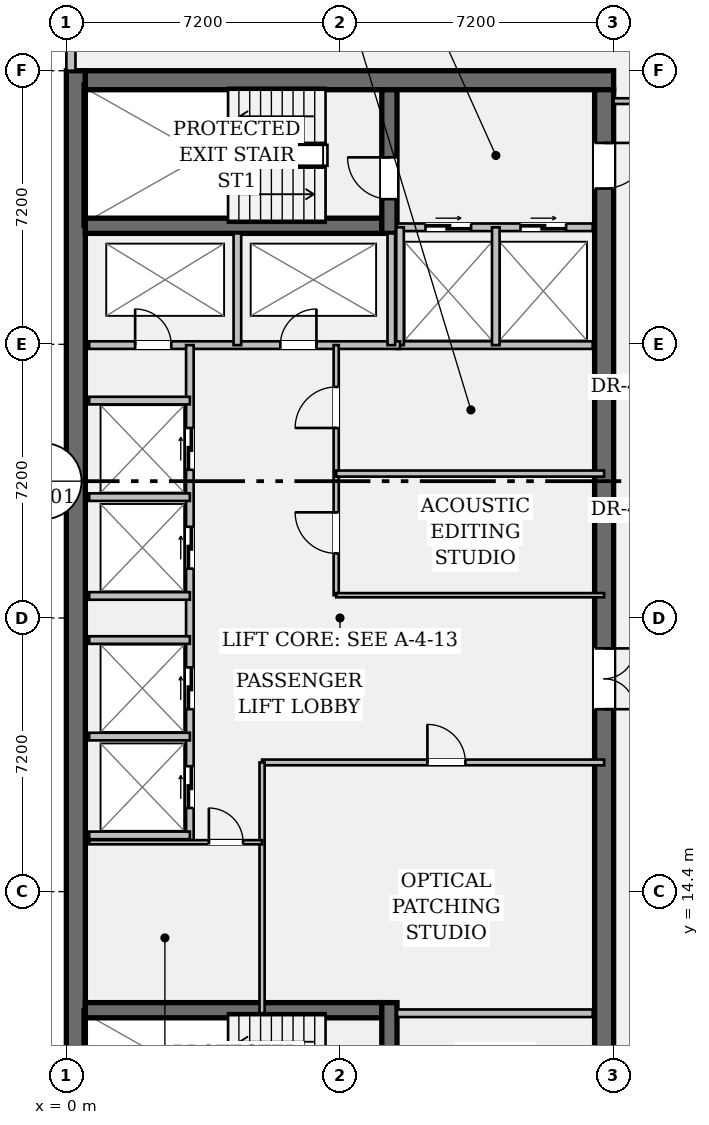
"""IFC4 building model, lengths in metres.
Left out: names, types, materials, properties, quantities, classifications, styles, units other than length and angle.
Written with IfcOpenShell. Run it as: python <this file> out.ifc"""

import sys

from ifc_helpers import new_model, si_unit, direction, frame, frame_2d, origin, place, context, subcontext, project, spatial, rectangle, extrude, element, fill, save


model = new_model("IFC4")
c1 = context("Model", 3, precision=1e-05, world=origin(), true_north=direction((0.0, 1.0)))
c2 = subcontext(c1, "Body", "Model", "MODEL_VIEW")
j1 = project(units=[si_unit("LENGTHUNIT", "METRE"), si_unit("PLANEANGLEUNIT", "RADIAN")], contexts=[c1])
p1 = place(None, origin())
s1 = spatial("IfcSite", under=j1, at=p1, CompositionType="ELEMENT")
p2 = place(p1, origin())
s2 = spatial("IfcBuilding", under=s1, at=p2, CompositionType="ELEMENT")
p3 = place(p2, frame((0.0, 0.0, 279.65)))
s3 = spatial("IfcBuildingStorey", under=s2, at=p3, CompositionType="ELEMENT", Elevation=279.65)
p4 = place(p3, frame((0.25, 7.2, 0.0), z_axis=(0.0, 0.0, 1.0), x_axis=(0.0, 1.0, 0.0)))
e1 = element("IfcWall", 1, at=p4, inside=s3, PredefinedType="SHEAR", context=c2, shape_type="SweptSolid", body=[
    extrude(rectangle(XDim=28.8, YDim=0.5, at=frame_2d((14.4, 0.0))), origin(), (0.0, 0.0, 1.0), 3.24),
])
p5 = place(p3, frame((0.5, 35.75, 0.0), z_axis=(0.0, 0.0, 1.0), x_axis=(1.0, 0.0, 0.0)))
e2 = element("IfcWall", 2, at=p5, inside=s3, PredefinedType="SHEAR", context=c2, shape_type="SweptSolid", body=[
    extrude(rectangle(XDim=13.9, YDim=0.5, at=frame_2d((6.95, 0.0))), origin(), (0.0, 0.0, 1.0), 3.24),
])
p6 = place(p3, frame((14.15, 35.5, 0.0), z_axis=(0.0, 0.0, 1.0), x_axis=(0.0, -1.0, 0.0)))
e3 = element("IfcWall", 3, at=p6, inside=s3, PredefinedType="SHEAR", context=c2, shape_type="SweptSolid", body=[
    extrude(rectangle(XDim=27.8, YDim=0.5, at=frame_2d((13.9, 0.0))), origin(), (0.0, 0.0, 1.0), 3.24),
])
p7 = place(p6, frame((1.4, 0.0, 0.0)))
e4 = element("IfcOpeningElement", 4, at=p7, cuts=e3, PredefinedType="OPENING", context=c2, shape_type="SweptSolid", body=[
    extrude(rectangle(XDim=1.2, YDim=2.15, at=frame_2d((0.6, 1.075))), frame((0.0, 0.262, 0.0), z_axis=(0.0, -1.0, 0.0), x_axis=(1.0, 0.0, 0.0)), (0.0, 0.0, 1.0), 0.524),
])
p8 = place(p6, frame((25.35, 0.0, 0.0)))
e5 = element("IfcOpeningElement", 5, at=p8, cuts=e3, PredefinedType="OPENING", context=c2, shape_type="SweptSolid", body=[
    extrude(rectangle(XDim=1.2, YDim=2.15, at=frame_2d((0.6, 1.075))), frame((0.0, 0.262, 0.0), z_axis=(0.0, -1.0, 0.0), x_axis=(1.0, 0.0, 0.0)), (0.0, 0.0, 1.0), 0.524),
])
p9 = place(p6, frame((14.7, 0.0, 0.0)))
e6 = element("IfcOpeningElement", 6, at=p9, cuts=e3, PredefinedType="OPENING", context=c2, shape_type="SweptSolid", body=[
    extrude(rectangle(XDim=1.6, YDim=2.2, at=frame_2d((0.8, 1.1))), frame((0.0, 0.262, 0.0), z_axis=(0.0, -1.0, 0.0), x_axis=(1.0, 0.0, 0.0)), (0.0, 0.0, 1.0), 0.524),
])
for number, where, z_axis, x_axis in (
    (7, (0.5, 31.92, 0.0), (0.0, 0.0, 1.0), (1.0, 0.0, 0.0)),
    (8, (0.5, 11.28, 0.0), (0.0, 0.0, 1.0), (1.0, 0.0, 0.0)),
):
    element("IfcWall", number, at=place(p3, frame(where, z_axis=z_axis, x_axis=x_axis)), inside=s3, PredefinedType="SHEAR", context=c2, shape_type="SweptSolid", body=[
        extrude(rectangle(XDim=7.8, YDim=0.4, at=frame_2d((3.9, 0.0))), origin(), (0.0, 0.0, 1.0), 3.24),
    ])
p10 = place(p3, frame((8.5, 31.72, 0.0), z_axis=(0.0, 0.0, 1.0), x_axis=(0.0, 1.0, 0.0)))
e9 = element("IfcWall", 9, at=p10, inside=s3, PredefinedType="SHEAR", context=c2, shape_type="SweptSolid", body=[
    extrude(rectangle(XDim=3.78, YDim=0.4, at=frame_2d((1.89, 0.0))), origin(), (0.0, 0.0, 1.0), 3.24),
])
p11 = place(p10, frame((0.9, 0.0, 0.0)))
e10 = element("IfcOpeningElement", 10, at=p11, cuts=e9, PredefinedType="OPENING", context=c2, shape_type="SweptSolid", body=[
    extrude(rectangle(XDim=1.1, YDim=2.15, at=frame_2d((0.55, 1.075))), frame((0.0, 0.212, 0.0), z_axis=(0.0, -1.0, 0.0), x_axis=(1.0, 0.0, 0.0)), (0.0, 0.0, 1.0), 0.424),
])
p12 = place(p3, frame((8.5, 7.7, 0.0), z_axis=(0.0, 0.0, 1.0), x_axis=(0.0, 1.0, 0.0)))
e11 = element("IfcWall", 11, at=p12, inside=s3, PredefinedType="SHEAR", context=c2, shape_type="SweptSolid", body=[
    extrude(rectangle(XDim=3.78, YDim=0.4, at=frame_2d((1.89, 0.0))), origin(), (0.0, 0.0, 1.0), 3.24),
])
p13 = place(p12, frame((0.85, 0.0, 0.0)))
e12 = element("IfcOpeningElement", 12, at=p13, cuts=e11, PredefinedType="OPENING", context=c2, shape_type="SweptSolid", body=[
    extrude(rectangle(XDim=1.1, YDim=2.15, at=frame_2d((0.55, 1.075))), frame((0.0, 0.212, 0.0), z_axis=(0.0, -1.0, 0.0), x_axis=(1.0, 0.0, 0.0)), (0.0, 0.0, 1.0), 0.424),
])
p14 = place(p3, frame((0.12, 36.0, 0.0), z_axis=(0.0, 0.0, 1.0), x_axis=(0.0, 1.0, 0.0)))
e13 = element("IfcWall", 13, at=p14, inside=s3, PredefinedType="STANDARD", context=c2, shape_type="SweptSolid", body=[
    extrude(rectangle(XDim=1.21, YDim=0.24, at=frame_2d((0.605, 0.0))), origin(), (0.0, 0.0, 1.0), 3.24),
])
p15 = place(p3, frame((8.7, 31.88, 0.0), z_axis=(0.0, 0.0, 1.0), x_axis=(1.0, 0.0, 0.0)))
e14 = element("IfcWall", 14, at=p15, inside=s3, PredefinedType="PARTITIONING", context=c2, shape_type="SweptSolid", body=[
    extrude(rectangle(XDim=5.15, YDim=0.2, at=frame_2d((2.575, 0.0))), origin(), (0.0, 0.0, 1.0), 3.24),
])
p16 = place(p15, frame((0.75, 0.0, 0.0)))
e15 = element("IfcOpeningElement", 15, at=p16, cuts=e14, PredefinedType="OPENING", context=c2, shape_type="SweptSolid", body=[
    extrude(rectangle(XDim=1.2, YDim=2.2, at=frame_2d((0.6, 1.1))), frame((0.0, 0.112, 0.0), z_axis=(0.0, -1.0, 0.0), x_axis=(1.0, 0.0, 0.0)), (0.0, 0.0, 1.0), 0.224),
])
p17 = place(p15, frame((3.25, 0.0, 0.0)))
e16 = element("IfcOpeningElement", 16, at=p17, cuts=e14, PredefinedType="OPENING", context=c2, shape_type="SweptSolid", body=[
    extrude(rectangle(XDim=1.2, YDim=2.2, at=frame_2d((0.6, 1.1))), frame((0.0, 0.112, 0.0), z_axis=(0.0, -1.0, 0.0), x_axis=(1.0, 0.0, 0.0)), (0.0, 0.0, 1.0), 0.224),
])
for number, where, z_axis, x_axis in (
    (17, (8.7, 11.2, 0.0), (0.0, 0.0, 1.0), (1.0, 0.0, 0.0)),
    (18, (8.7, 28.78, 0.0), (0.0, 0.0, 1.0), (1.0, 0.0, 0.0)),
):
    element("IfcWall", number, at=place(p3, frame(where, z_axis=z_axis, x_axis=x_axis)), inside=s3, PredefinedType="PARTITIONING", context=c2, shape_type="SweptSolid", body=[
        extrude(rectangle(XDim=5.15, YDim=0.2, at=frame_2d((2.575, 0.0))), origin(), (0.0, 0.0, 1.0), 3.24),
    ])
for number, where, z_axis, x_axis in (
    (19, (8.78, 28.78, 0.0), (0.0, 0.0, 1.0), (0.0, 1.0, 0.0)),
    (20, (11.3, 28.78, 0.0), (0.0, 0.0, 1.0), (0.0, 1.0, 0.0)),
):
    element("IfcWall", number, at=place(p3, frame(where, z_axis=z_axis, x_axis=x_axis)), inside=s3, PredefinedType="PARTITIONING", context=c2, shape_type="SweptSolid", body=[
        extrude(rectangle(XDim=3.1, YDim=0.2, at=frame_2d((1.55, 0.0))), origin(), (0.0, 0.0, 1.0), 3.24),
    ])
p18 = place(p3, frame((0.6, 28.78, 0.0), z_axis=(0.0, 0.0, 1.0), x_axis=(1.0, 0.0, 0.0)))
e21 = element("IfcWall", 21, at=p18, inside=s3, PredefinedType="PARTITIONING", context=c2, shape_type="SweptSolid", body=[
    extrude(rectangle(XDim=8.18, YDim=0.2, at=frame_2d((4.09, 0.0))), origin(), (0.0, 0.0, 1.0), 3.24),
])
p19 = place(p18, frame((1.21, 0.0, 0.0)))
e22 = element("IfcOpeningElement", 22, at=p19, cuts=e21, PredefinedType="OPENING", context=c2, shape_type="SweptSolid", body=[
    extrude(rectangle(XDim=0.95, YDim=2.15, at=frame_2d((0.475, 1.075))), frame((0.0, 0.112, 0.0), z_axis=(0.0, -1.0, 0.0), x_axis=(1.0, 0.0, 0.0)), (0.0, 0.0, 1.0), 0.224),
])
p20 = place(p18, frame((5.03, 0.0, 0.0)))
e23 = element("IfcOpeningElement", 23, at=p20, cuts=e21, PredefinedType="OPENING", context=c2, shape_type="SweptSolid", body=[
    extrude(rectangle(XDim=0.95, YDim=2.15, at=frame_2d((0.475, 1.075))), frame((0.0, 0.112, 0.0), z_axis=(0.0, -1.0, 0.0), x_axis=(1.0, 0.0, 0.0)), (0.0, 0.0, 1.0), 0.224),
])
for number, where, z_axis, x_axis in (
    (24, (4.5, 28.78, 0.0), (0.0, 0.0, 1.0), (0.0, 1.0, 0.0)),
    (25, (8.55, 28.78, 0.0), (0.0, 0.0, 1.0), (0.0, 1.0, 0.0)),
):
    element("IfcWall", number, at=place(p3, frame(where, z_axis=z_axis, x_axis=x_axis)), inside=s3, PredefinedType="PARTITIONING", context=c2, shape_type="SweptSolid", body=[
        extrude(rectangle(XDim=2.94, YDim=0.2, at=frame_2d((1.47, 0.0))), origin(), (0.0, 0.0, 1.0), 3.24),
    ])
p21 = place(p3, frame((3.25, 15.7, 0.0), z_axis=(0.0, 0.0, 1.0), x_axis=(0.0, 1.0, 0.0)))
e26 = element("IfcWall", 26, at=p21, inside=s3, PredefinedType="PARTITIONING", context=c2, shape_type="SweptSolid", body=[
    extrude(rectangle(XDim=13.08, YDim=0.2, at=frame_2d((6.54, 0.0))), origin(), (0.0, 0.0, 1.0), 3.24),
])
p22 = place(p21, frame((0.9, 0.0, 0.0)))
e27 = element("IfcOpeningElement", 27, at=p22, cuts=e26, PredefinedType="OPENING", context=c2, shape_type="SweptSolid", body=[
    extrude(rectangle(XDim=1.1, YDim=2.2, at=frame_2d((0.55, 1.1))), frame((0.0, 0.112, 0.0), z_axis=(0.0, -1.0, 0.0), x_axis=(1.0, 0.0, 0.0)), (0.0, 0.0, 1.0), 0.224),
])
p23 = place(p21, frame((3.5, 0.0, 0.0)))
e28 = element("IfcOpeningElement", 28, at=p23, cuts=e26, PredefinedType="OPENING", context=c2, shape_type="SweptSolid", body=[
    extrude(rectangle(XDim=1.1, YDim=2.2, at=frame_2d((0.55, 1.1))), frame((0.0, 0.112, 0.0), z_axis=(0.0, -1.0, 0.0), x_axis=(1.0, 0.0, 0.0)), (0.0, 0.0, 1.0), 0.224),
])
p24 = place(p21, frame((7.2, 0.0, 0.0)))
e29 = element("IfcOpeningElement", 29, at=p24, cuts=e26, PredefinedType="OPENING", context=c2, shape_type="SweptSolid", body=[
    extrude(rectangle(XDim=1.1, YDim=2.2, at=frame_2d((0.55, 1.1))), frame((0.0, 0.112, 0.0), z_axis=(0.0, -1.0, 0.0), x_axis=(1.0, 0.0, 0.0)), (0.0, 0.0, 1.0), 0.224),
])
p25 = place(p21, frame((9.8, 0.0, 0.0)))
e30 = element("IfcOpeningElement", 30, at=p25, cuts=e26, PredefinedType="OPENING", context=c2, shape_type="SweptSolid", body=[
    extrude(rectangle(XDim=1.1, YDim=2.2, at=frame_2d((0.55, 1.1))), frame((0.0, 0.112, 0.0), z_axis=(0.0, -1.0, 0.0), x_axis=(1.0, 0.0, 0.0)), (0.0, 0.0, 1.0), 0.224),
])
for number, where, z_axis, x_axis in (
    (31, (0.6, 15.88, 0.0), (0.0, 0.0, 1.0), (1.0, 0.0, 0.0)),
    (32, (0.6, 18.48, 0.0), (0.0, 0.0, 1.0), (1.0, 0.0, 0.0)),
    (33, (0.6, 22.18, 0.0), (0.0, 0.0, 1.0), (1.0, 0.0, 0.0)),
    (34, (0.6, 24.78, 0.0), (0.0, 0.0, 1.0), (1.0, 0.0, 0.0)),
    (35, (0.6, 21.02, 0.0), (0.0, 0.0, 1.0), (1.0, 0.0, 0.0)),
    (36, (0.6, 27.32, 0.0), (0.0, 0.0, 1.0), (1.0, 0.0, 0.0)),
):
    element("IfcWall", number, at=place(p3, frame(where, z_axis=z_axis, x_axis=x_axis)), inside=s3, PredefinedType="PARTITIONING", context=c2, shape_type="SweptSolid", body=[
        extrude(rectangle(XDim=2.65, YDim=0.2, at=frame_2d((1.325, 0.0))), origin(), (0.0, 0.0, 1.0), 3.24),
    ])
p26 = place(p3, frame((7.1, 22.2, 0.0), z_axis=(0.0, 0.0, 1.0), x_axis=(0.0, 1.0, 0.0)))
e37 = element("IfcWall", 37, at=p26, inside=s3, PredefinedType="PARTITIONING", context=c2, shape_type="SweptSolid", body=[
    extrude(rectangle(XDim=6.58, YDim=0.135, at=frame_2d((3.29, 0.0))), origin(), (0.0, 0.0, 1.0), 3.24),
])
p27 = place(p26, frame((1.1, 0.0, 0.0)))
e38 = element("IfcOpeningElement", 38, at=p27, cuts=e37, PredefinedType="OPENING", context=c2, shape_type="SweptSolid", body=[
    extrude(rectangle(XDim=1.08, YDim=2.15, at=frame_2d((0.54, 1.075))), frame((0.0, 0.08, 0.0), z_axis=(0.0, -1.0, 0.0), x_axis=(1.0, 0.0, 0.0)), (0.0, 0.0, 1.0), 0.159),
])
p28 = place(p26, frame((4.4, 0.0, 0.0)))
e39 = element("IfcOpeningElement", 39, at=p28, cuts=e37, PredefinedType="OPENING", context=c2, shape_type="SweptSolid", body=[
    extrude(rectangle(XDim=1.08, YDim=2.15, at=frame_2d((0.54, 1.075))), frame((0.0, 0.08, 0.0), z_axis=(0.0, -1.0, 0.0), x_axis=(1.0, 0.0, 0.0)), (0.0, 0.0, 1.0), 0.159),
])
p29 = place(p3, frame((7.1, 22.2, 0.0), z_axis=(0.0, 0.0, 1.0), x_axis=(1.0, 0.0, 0.0)))
e40 = element("IfcWall", 40, at=p29, inside=s3, PredefinedType="PARTITIONING", context=c2, shape_type="SweptSolid", body=[
    extrude(rectangle(XDim=7.05, YDim=0.11, at=frame_2d((3.525, 0.0))), origin(), (0.0, 0.0, 1.0), 3.24),
])
p30 = place(p3, frame((7.1, 25.4, 0.0), z_axis=(0.0, 0.0, 1.0), x_axis=(1.0, 0.0, 0.0)))
e41 = element("IfcWall", 41, at=p30, inside=s3, PredefinedType="PARTITIONING", context=c2, shape_type="SweptSolid", body=[
    extrude(rectangle(XDim=7.05, YDim=0.16, at=frame_2d((3.525, 0.0))), origin(), (0.0, 0.0, 1.0), 3.24),
])
p31 = place(p3, frame((5.15, 17.8, 0.0), z_axis=(0.0, 0.0, 1.0), x_axis=(1.0, 0.0, 0.0)))
e42 = element("IfcWall", 42, at=p31, inside=s3, PredefinedType="PARTITIONING", context=c2, shape_type="SweptSolid", body=[
    extrude(rectangle(XDim=9.0, YDim=0.15, at=frame_2d((4.5, 0.0))), origin(), (0.0, 0.0, 1.0), 3.24),
])
p32 = place(p31, frame((4.35, 0.0, 0.0)))
e43 = element("IfcOpeningElement", 43, at=p32, cuts=e42, PredefinedType="OPENING", context=c2, shape_type="SweptSolid", body=[
    extrude(rectangle(XDim=1.0, YDim=2.15, at=frame_2d((0.5, 1.075))), frame((0.0, 0.087, 0.0), z_axis=(0.0, -1.0, 0.0), x_axis=(1.0, 0.0, 0.0)), (0.0, 0.0, 1.0), 0.174),
])
p33 = place(p3, frame((5.15, 11.2, 0.0), z_axis=(0.0, 0.0, 1.0), x_axis=(0.0, 1.0, 0.0)))
e44 = element("IfcWall", 44, at=p33, inside=s3, PredefinedType="PARTITIONING", context=c2, shape_type="SweptSolid", body=[
    extrude(rectangle(XDim=6.6, YDim=0.135, at=frame_2d((3.3, 0.0))), origin(), (0.0, 0.0, 1.0), 3.24),
])
p34 = place(p3, frame((0.6, 15.7, 0.0), z_axis=(0.0, 0.0, 1.0), x_axis=(1.0, 0.0, 0.0)))
e45 = element("IfcWall", 45, at=p34, inside=s3, PredefinedType="PARTITIONING", context=c2, shape_type="SweptSolid", body=[
    extrude(rectangle(XDim=4.55, YDim=0.11, at=frame_2d((2.275, 0.0))), origin(), (0.0, 0.0, 1.0), 3.24),
])
p35 = place(p34, frame((3.15, 0.0, 0.0)))
e46 = element("IfcOpeningElement", 46, at=p35, cuts=e45, PredefinedType="OPENING", context=c2, shape_type="SweptSolid", body=[
    extrude(rectangle(XDim=0.9, YDim=2.15, at=frame_2d((0.45, 1.075))), frame((0.0, 0.067, 0.0), z_axis=(0.0, -1.0, 0.0), x_axis=(1.0, 0.0, 0.0)), (0.0, 0.0, 1.0), 0.134),
])
p36 = place(p3, frame((14.4, 35.2, 0.0), z_axis=(0.0, 0.0, 1.0), x_axis=(1.0, 0.0, 0.0)))
e47 = element("IfcWall", 47, at=p36, inside=s3, PredefinedType="PARTITIONING", context=c2, shape_type="SweptSolid", body=[
    extrude(rectangle(XDim=2.95, YDim=0.15, at=frame_2d((1.475, 0.0))), origin(), (0.0, 0.0, 1.0), 2.808),
])
p37 = place(p36, frame((0.95, 0.0, 0.0)))
e48 = element("IfcOpeningElement", 48, at=p37, cuts=e47, PredefinedType="OPENING", context=c2, shape_type="SweptSolid", body=[
    extrude(rectangle(XDim=1.0, YDim=2.15, at=frame_2d((0.5, 1.075))), frame((0.0, 0.087, 0.0), z_axis=(0.0, -1.0, 0.0), x_axis=(1.0, 0.0, 0.0)), (0.0, 0.0, 1.0), 0.174),
])
p38 = place(p11, origin())
e49 = element("IfcDoor", 49, at=p38, inside=s3, OperationType="SINGLE_SWING_RIGHT", PredefinedType="DOOR", context=c2, shape_type="SweptSolid", body=[
    extrude(rectangle(XDim=1.1, YDim=2.15, at=frame_2d((0.55, 1.075))), frame((0.0, 0.025, 0.0), z_axis=(0.0, -1.0, 0.0), x_axis=(1.0, 0.0, 0.0)), (0.0, 0.0, 1.0), 0.05),
])
fill(e10, e49)
p39 = place(p7, origin())
e50 = element("IfcDoor", 50, at=p39, inside=s3, OperationType="SINGLE_SWING_LEFT", PredefinedType="DOOR", context=c2, shape_type="SweptSolid", body=[
    extrude(rectangle(XDim=1.2, YDim=2.15, at=frame_2d((0.6, 1.075))), frame((0.0, 0.025, 0.0), z_axis=(0.0, -1.0, 0.0), x_axis=(1.0, 0.0, 0.0)), (0.0, 0.0, 1.0), 0.05),
])
fill(e4, e50)
p40 = place(p16, origin())
e51 = element("IfcDoor", 51, at=p40, inside=s3, OperationType="DOUBLE_DOOR_SLIDING", PredefinedType="DOOR", context=c2, shape_type="SweptSolid", body=[
    extrude(rectangle(XDim=1.2, YDim=2.2, at=frame_2d((0.6, 1.1))), frame((0.0, 0.025, 0.0), z_axis=(0.0, -1.0, 0.0), x_axis=(1.0, 0.0, 0.0)), (0.0, 0.0, 1.0), 0.05),
])
fill(e15, e51)
p41 = place(p17, origin())
e52 = element("IfcDoor", 52, at=p41, inside=s3, OperationType="DOUBLE_DOOR_SLIDING", PredefinedType="DOOR", context=c2, shape_type="SweptSolid", body=[
    extrude(rectangle(XDim=1.2, YDim=2.2, at=frame_2d((0.6, 1.1))), frame((0.0, 0.025, 0.0), z_axis=(0.0, -1.0, 0.0), x_axis=(1.0, 0.0, 0.0)), (0.0, 0.0, 1.0), 0.05),
])
fill(e16, e52)
p42 = place(p19, origin())
e53 = element("IfcDoor", 53, at=p42, inside=s3, OperationType="SINGLE_SWING_LEFT", PredefinedType="DOOR", context=c2, shape_type="SweptSolid", body=[
    extrude(rectangle(XDim=0.95, YDim=2.15, at=frame_2d((0.475, 1.075))), frame((0.0, 0.025, 0.0), z_axis=(0.0, -1.0, 0.0), x_axis=(1.0, 0.0, 0.0)), (0.0, 0.0, 1.0), 0.05),
])
fill(e22, e53)
p43 = place(p20, origin())
e54 = element("IfcDoor", 54, at=p43, inside=s3, OperationType="SINGLE_SWING_RIGHT", PredefinedType="DOOR", context=c2, shape_type="SweptSolid", body=[
    extrude(rectangle(XDim=0.95, YDim=2.15, at=frame_2d((0.475, 1.075))), frame((0.0, 0.025, 0.0), z_axis=(0.0, -1.0, 0.0), x_axis=(1.0, 0.0, 0.0)), (0.0, 0.0, 1.0), 0.05),
])
fill(e23, e54)
p44 = place(p9, origin())
e55 = element("IfcDoor", 55, at=p44, inside=s3, OperationType="DOUBLE_DOOR_SINGLE_SWING", PredefinedType="DOOR", context=c2, shape_type="SweptSolid", body=[
    extrude(rectangle(XDim=1.6, YDim=2.2, at=frame_2d((0.8, 1.1))), frame((0.0, 0.025, 0.0), z_axis=(0.0, -1.0, 0.0), x_axis=(1.0, 0.0, 0.0)), (0.0, 0.0, 1.0), 0.05),
])
fill(e6, e55)
p45 = place(p22, origin())
e56 = element("IfcDoor", 56, at=p45, inside=s3, OperationType="DOUBLE_DOOR_SLIDING", PredefinedType="DOOR", context=c2, shape_type="SweptSolid", body=[
    extrude(rectangle(XDim=1.1, YDim=2.2, at=frame_2d((0.55, 1.1))), frame((0.0, 0.025, 0.0), z_axis=(0.0, -1.0, 0.0), x_axis=(1.0, 0.0, 0.0)), (0.0, 0.0, 1.0), 0.05),
])
fill(e27, e56)
p46 = place(p23, origin())
e57 = element("IfcDoor", 57, at=p46, inside=s3, OperationType="DOUBLE_DOOR_SLIDING", PredefinedType="DOOR", context=c2, shape_type="SweptSolid", body=[
    extrude(rectangle(XDim=1.1, YDim=2.2, at=frame_2d((0.55, 1.1))), frame((0.0, 0.025, 0.0), z_axis=(0.0, -1.0, 0.0), x_axis=(1.0, 0.0, 0.0)), (0.0, 0.0, 1.0), 0.05),
])
fill(e28, e57)
p47 = place(p24, origin())
e58 = element("IfcDoor", 58, at=p47, inside=s3, OperationType="DOUBLE_DOOR_SLIDING", PredefinedType="DOOR", context=c2, shape_type="SweptSolid", body=[
    extrude(rectangle(XDim=1.1, YDim=2.2, at=frame_2d((0.55, 1.1))), frame((0.0, 0.025, 0.0), z_axis=(0.0, -1.0, 0.0), x_axis=(1.0, 0.0, 0.0)), (0.0, 0.0, 1.0), 0.05),
])
fill(e29, e58)
p48 = place(p25, origin())
e59 = element("IfcDoor", 59, at=p48, inside=s3, OperationType="DOUBLE_DOOR_SLIDING", PredefinedType="DOOR", context=c2, shape_type="SweptSolid", body=[
    extrude(rectangle(XDim=1.1, YDim=2.2, at=frame_2d((0.55, 1.1))), frame((0.0, 0.025, 0.0), z_axis=(0.0, -1.0, 0.0), x_axis=(1.0, 0.0, 0.0)), (0.0, 0.0, 1.0), 0.05),
])
fill(e30, e59)
p49 = place(p27, origin())
e60 = element("IfcDoor", 60, at=p49, inside=s3, OperationType="SINGLE_SWING_RIGHT", PredefinedType="DOOR", context=c2, shape_type="SweptSolid", body=[
    extrude(rectangle(XDim=1.08, YDim=2.15, at=frame_2d((0.54, 1.075))), frame((0.0, 0.025, 0.0), z_axis=(0.0, -1.0, 0.0), x_axis=(1.0, 0.0, 0.0)), (0.0, 0.0, 1.0), 0.05),
])
fill(e38, e60)
p50 = place(p28, origin())
e61 = element("IfcDoor", 61, at=p50, inside=s3, OperationType="SINGLE_SWING_LEFT", PredefinedType="DOOR", context=c2, shape_type="SweptSolid", body=[
    extrude(rectangle(XDim=1.08, YDim=2.15, at=frame_2d((0.54, 1.075))), frame((0.0, 0.025, 0.0), z_axis=(0.0, -1.0, 0.0), x_axis=(1.0, 0.0, 0.0)), (0.0, 0.0, 1.0), 0.05),
])
fill(e39, e61)
p51 = place(p32, origin())
e62 = element("IfcDoor", 62, at=p51, inside=s3, OperationType="SINGLE_SWING_LEFT", PredefinedType="DOOR", context=c2, shape_type="SweptSolid", body=[
    extrude(rectangle(XDim=1.0, YDim=2.15, at=frame_2d((0.5, 1.075))), frame((0.0, 0.025, 0.0), z_axis=(0.0, -1.0, 0.0), x_axis=(1.0, 0.0, 0.0)), (0.0, 0.0, 1.0), 0.05),
])
fill(e43, e62)
p52 = place(p35, origin())
e63 = element("IfcDoor", 63, at=p52, inside=s3, OperationType="SINGLE_SWING_LEFT", PredefinedType="DOOR", context=c2, shape_type="SweptSolid", body=[
    extrude(rectangle(XDim=0.9, YDim=2.15, at=frame_2d((0.45, 1.075))), frame((0.0, 0.025, 0.0), z_axis=(0.0, -1.0, 0.0), x_axis=(1.0, 0.0, 0.0)), (0.0, 0.0, 1.0), 0.05),
])
fill(e46, e63)
save(model, sys.argv[1])
